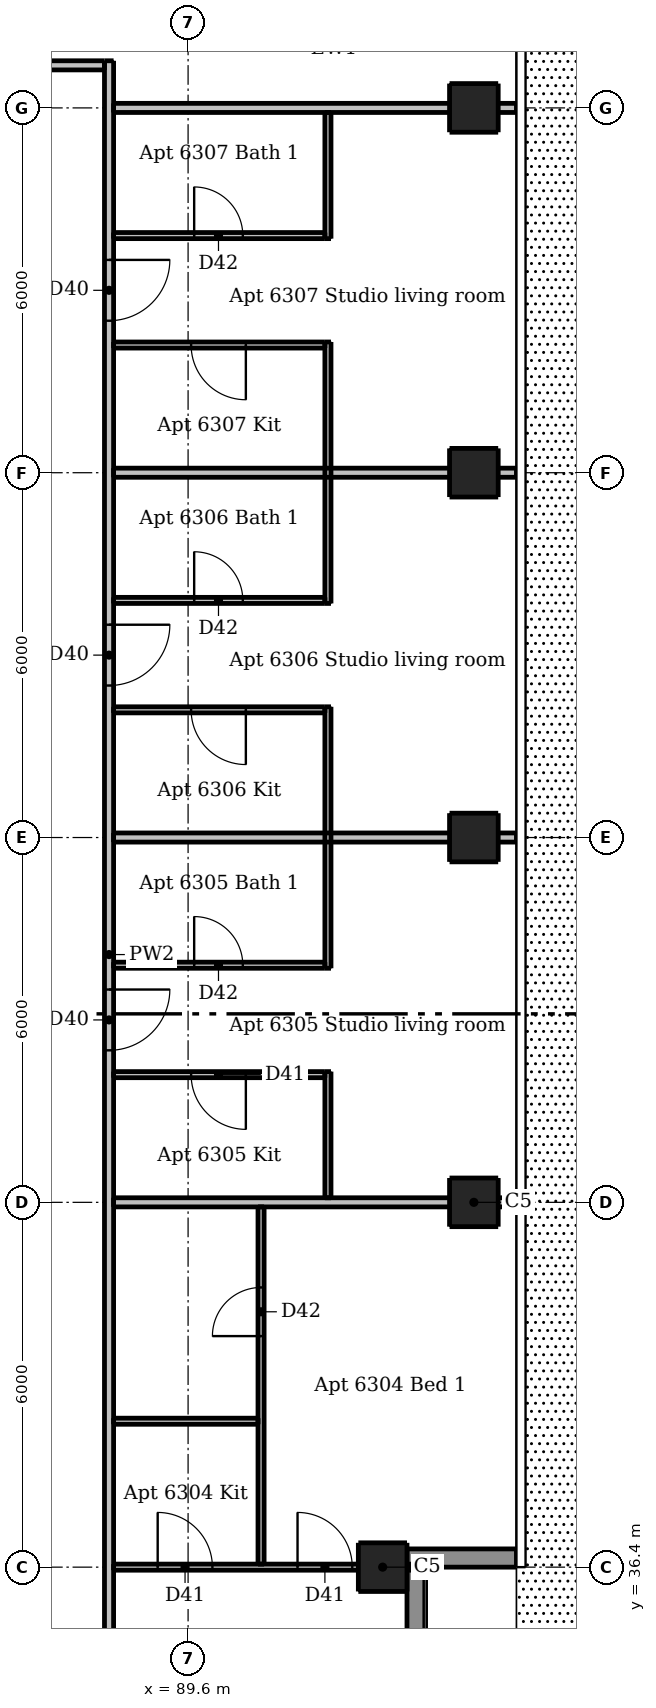
"""IFC4 building model, lengths in metres.
Left out: names, types, materials, properties, quantities, classifications, styles, units other than length and angle.
Written with IfcOpenShell. Run it as: python <this file> out.ifc"""

import sys

from ifc_helpers import new_model, si_unit, direction, frame, frame_2d, origin, origin_2d, place, context, subcontext, project, spatial, rectangle, extrude, element, fill, save


model = new_model("IFC4")
c1 = context("Model", 3, precision=1e-05, world=origin(), true_north=direction((0.0, 1.0)))
c2 = subcontext(c1, "Body", "Model", "MODEL_VIEW")
j1 = project(units=[si_unit("LENGTHUNIT", "METRE"), si_unit("PLANEANGLEUNIT", "RADIAN")], contexts=[c1])
p1 = place(None, origin())
s1 = spatial("IfcSite", under=j1, at=p1, CompositionType="ELEMENT")
p2 = place(p1, origin())
s2 = spatial("IfcBuilding", under=s1, at=p2, CompositionType="ELEMENT")
p3 = place(p2, frame((0.0, 0.0, 238.9)))
s3 = spatial("IfcBuildingStorey", under=s2, at=p3, CompositionType="ELEMENT", Elevation=238.9)
for number, where, z_axis, x_axis in (
    (1, (92.8, 36.4, 0.0), (0.0, 0.0, 1.0), (1.0, 0.0, 0.0)),
    (2, (94.3, 42.4, 0.0), (0.0, 0.0, 1.0), (1.0, 0.0, 0.0)),
    (3, (94.3, 48.4, 0.0), (0.0, 0.0, 1.0), (1.0, 0.0, 0.0)),
    (4, (94.3, 54.4, 0.0), (0.0, 0.0, 1.0), (1.0, 0.0, 0.0)),
    (5, (94.3, 60.4, 0.0), (0.0, 0.0, 1.0), (1.0, 0.0, 0.0)),
):
    element("IfcColumn", number, at=place(p3, frame(where, z_axis=z_axis, x_axis=x_axis)), inside=s3, PredefinedType="COLUMN", context=c2, shape_type="SweptSolid", body=[
        extrude(rectangle(XDim=0.8, YDim=0.8, at=origin_2d()), origin(), (0.0, 0.0, 1.0), 3.05),
    ])
p4 = place(p3, frame((93.2, 36.55, 0.0), z_axis=(0.0, 0.0, 1.0), x_axis=(1.0, 0.0, 0.0)))
e6 = element("IfcWall", 6, at=p4, inside=s3, PredefinedType="SOLIDWALL", context=c2, shape_type="SweptSolid", body=[
    extrude(rectangle(XDim=1.8, YDim=0.3, at=frame_2d((0.9, 0.0))), origin(), (0.0, 0.0, 1.0), 3.05),
])
p5 = place(p3, frame((93.35, 31.3, 0.0), z_axis=(0.0, 0.0, 1.0), x_axis=(0.0, 1.0, 0.0)))
e7 = element("IfcWall", 7, at=p5, inside=s3, PredefinedType="SOLIDWALL", context=c2, shape_type="SweptSolid", body=[
    extrude(rectangle(XDim=5.1, YDim=0.3, at=frame_2d((2.55, 0.0))), origin(), (0.0, 0.0, 1.0), 3.05),
])
p6 = place(p5, frame((1.2, 0.0, 0.15)))
e8 = element("IfcOpeningElement", 8, at=p6, cuts=e7, PredefinedType="OPENING", context=c2, shape_type="SweptSolid", body=[
    extrude(rectangle(XDim=2.7, YDim=2.1, at=frame_2d((1.35, 1.05))), frame((0.0, 0.16, 0.0), z_axis=(0.0, -1.0, 0.0), x_axis=(1.0, 0.0, 0.0)), (0.0, 0.0, 1.0), 0.32),
])
p7 = place(p3, frame((90.8, 36.45, 0.0), z_axis=(0.0, 0.0, 1.0), x_axis=(0.0, 1.0, 0.0)))
e9 = element("IfcWall", 9, at=p7, inside=s3, PredefinedType="PARTITIONING", context=c2, shape_type="SweptSolid", body=[
    extrude(rectangle(XDim=5.875, YDim=0.1, at=frame_2d((2.938, 0.0))), origin(), (0.0, 0.0, 1.0), 3.05),
])
p8 = place(p7, frame((3.75, 0.0, 0.0)))
e10 = element("IfcOpeningElement", 10, at=p8, cuts=e9, PredefinedType="OPENING", context=c2, shape_type="SweptSolid", body=[
    extrude(rectangle(XDim=0.8, YDim=2.1, at=frame_2d((0.4, 1.05))), frame((0.0, 0.06, 0.0), z_axis=(0.0, -1.0, 0.0), x_axis=(1.0, 0.0, 0.0)), (0.0, 0.0, 1.0), 0.12),
])
p9 = place(p3, frame((91.9, 42.475, 0.0), z_axis=(0.0, 0.0, 1.0), x_axis=(0.0, 1.0, 0.0)))
e11 = element("IfcWall", 11, at=p9, inside=s3, PredefinedType="PARTITIONING", context=c2, shape_type="SweptSolid", body=[
    extrude(rectangle(XDim=2.075, YDim=0.1, at=frame_2d((1.038, 0.0))), origin(), (0.0, 0.0, 1.0), 3.05),
])
for number, where, z_axis, x_axis in (
    (12, (91.9, 46.25, 0.0), (0.0, 0.0, 1.0), (0.0, 1.0, 0.0)),
    (13, (91.9, 52.25, 0.0), (0.0, 0.0, 1.0), (0.0, 1.0, 0.0)),
):
    element("IfcWall", number, at=place(p3, frame(where, z_axis=z_axis, x_axis=x_axis)), inside=s3, PredefinedType="PARTITIONING", context=c2, shape_type="SweptSolid", body=[
        extrude(rectangle(XDim=4.3, YDim=0.1, at=frame_2d((2.15, 0.0))), origin(), (0.0, 0.0, 1.0), 3.05),
    ])
p10 = place(p3, frame((91.9, 58.25, 0.0), z_axis=(0.0, 0.0, 1.0), x_axis=(0.0, 1.0, 0.0)))
e14 = element("IfcWall", 14, at=p10, inside=s3, PredefinedType="PARTITIONING", context=c2, shape_type="SweptSolid", body=[
    extrude(rectangle(XDim=2.075, YDim=0.1, at=frame_2d((1.038, 0.0))), origin(), (0.0, 0.0, 1.0), 3.05),
])
p11 = place(p3, frame((88.375, 58.3, 0.0), z_axis=(0.0, 0.0, 1.0), x_axis=(1.0, 0.0, 0.0)))
e15 = element("IfcWall", 15, at=p11, inside=s3, PredefinedType="PARTITIONING", context=c2, shape_type="SweptSolid", body=[
    extrude(rectangle(XDim=3.475, YDim=0.1, at=frame_2d((1.738, 0.0))), origin(), (0.0, 0.0, 1.0), 3.05),
])
p12 = place(p11, frame((1.325, 0.0, 0.0)))
e16 = element("IfcOpeningElement", 16, at=p12, cuts=e15, PredefinedType="OPENING", context=c2, shape_type="SweptSolid", body=[
    extrude(rectangle(XDim=0.8, YDim=2.1, at=frame_2d((0.4, 1.05))), frame((0.0, 0.06, 0.0), z_axis=(0.0, -1.0, 0.0), x_axis=(1.0, 0.0, 0.0)), (0.0, 0.0, 1.0), 0.12),
])
p13 = place(p3, frame((91.85, 56.5, 0.0), z_axis=(0.0, 0.0, 1.0), x_axis=(-1.0, 0.0, 0.0)))
e17 = element("IfcWall", 17, at=p13, inside=s3, PredefinedType="PARTITIONING", context=c2, shape_type="SweptSolid", body=[
    extrude(rectangle(XDim=3.475, YDim=0.1, at=frame_2d((1.738, 0.0))), origin(), (0.0, 0.0, 1.0), 3.05),
])
p14 = place(p13, frame((1.3, 0.0, 0.0)))
e18 = element("IfcOpeningElement", 18, at=p14, cuts=e17, PredefinedType="OPENING", context=c2, shape_type="SweptSolid", body=[
    extrude(rectangle(XDim=0.9, YDim=2.1, at=frame_2d((0.45, 1.05))), frame((0.0, 0.06, 0.0), z_axis=(0.0, -1.0, 0.0), x_axis=(1.0, 0.0, 0.0)), (0.0, 0.0, 1.0), 0.12),
])
p15 = place(p3, frame((88.375, 52.3, 0.0), z_axis=(0.0, 0.0, 1.0), x_axis=(1.0, 0.0, 0.0)))
e19 = element("IfcWall", 19, at=p15, inside=s3, PredefinedType="PARTITIONING", context=c2, shape_type="SweptSolid", body=[
    extrude(rectangle(XDim=3.475, YDim=0.1, at=frame_2d((1.738, 0.0))), origin(), (0.0, 0.0, 1.0), 3.05),
])
p16 = place(p15, frame((1.325, 0.0, 0.0)))
e20 = element("IfcOpeningElement", 20, at=p16, cuts=e19, PredefinedType="OPENING", context=c2, shape_type="SweptSolid", body=[
    extrude(rectangle(XDim=0.8, YDim=2.1, at=frame_2d((0.4, 1.05))), frame((0.0, 0.06, 0.0), z_axis=(0.0, -1.0, 0.0), x_axis=(1.0, 0.0, 0.0)), (0.0, 0.0, 1.0), 0.12),
])
p17 = place(p3, frame((91.85, 50.5, 0.0), z_axis=(0.0, 0.0, 1.0), x_axis=(-1.0, 0.0, 0.0)))
e21 = element("IfcWall", 21, at=p17, inside=s3, PredefinedType="PARTITIONING", context=c2, shape_type="SweptSolid", body=[
    extrude(rectangle(XDim=3.475, YDim=0.1, at=frame_2d((1.738, 0.0))), origin(), (0.0, 0.0, 1.0), 3.05),
])
p18 = place(p17, frame((1.3, 0.0, 0.0)))
e22 = element("IfcOpeningElement", 22, at=p18, cuts=e21, PredefinedType="OPENING", context=c2, shape_type="SweptSolid", body=[
    extrude(rectangle(XDim=0.9, YDim=2.1, at=frame_2d((0.45, 1.05))), frame((0.0, 0.06, 0.0), z_axis=(0.0, -1.0, 0.0), x_axis=(1.0, 0.0, 0.0)), (0.0, 0.0, 1.0), 0.12),
])
p19 = place(p3, frame((88.375, 46.3, 0.0), z_axis=(0.0, 0.0, 1.0), x_axis=(1.0, 0.0, 0.0)))
e23 = element("IfcWall", 23, at=p19, inside=s3, PredefinedType="PARTITIONING", context=c2, shape_type="SweptSolid", body=[
    extrude(rectangle(XDim=3.475, YDim=0.1, at=frame_2d((1.738, 0.0))), origin(), (0.0, 0.0, 1.0), 3.05),
])
p20 = place(p19, frame((1.325, 0.0, 0.0)))
e24 = element("IfcOpeningElement", 24, at=p20, cuts=e23, PredefinedType="OPENING", context=c2, shape_type="SweptSolid", body=[
    extrude(rectangle(XDim=0.8, YDim=2.1, at=frame_2d((0.4, 1.05))), frame((0.0, 0.06, 0.0), z_axis=(0.0, -1.0, 0.0), x_axis=(1.0, 0.0, 0.0)), (0.0, 0.0, 1.0), 0.12),
])
p21 = place(p3, frame((91.85, 44.5, 0.0), z_axis=(0.0, 0.0, 1.0), x_axis=(-1.0, 0.0, 0.0)))
e25 = element("IfcWall", 25, at=p21, inside=s3, PredefinedType="PARTITIONING", context=c2, shape_type="SweptSolid", body=[
    extrude(rectangle(XDim=3.475, YDim=0.1, at=frame_2d((1.738, 0.0))), origin(), (0.0, 0.0, 1.0), 3.05),
])
p22 = place(p21, frame((1.3, 0.0, 0.0)))
e26 = element("IfcOpeningElement", 26, at=p22, cuts=e25, PredefinedType="OPENING", context=c2, shape_type="SweptSolid", body=[
    extrude(rectangle(XDim=0.9, YDim=2.1, at=frame_2d((0.45, 1.05))), frame((0.0, 0.06, 0.0), z_axis=(0.0, -1.0, 0.0), x_axis=(1.0, 0.0, 0.0)), (0.0, 0.0, 1.0), 0.12),
])
p23 = place(p3, frame((88.375, 38.8, 0.0), z_axis=(0.0, 0.0, 1.0), x_axis=(1.0, 0.0, 0.0)))
e27 = element("IfcWall", 27, at=p23, inside=s3, PredefinedType="PARTITIONING", context=c2, shape_type="SweptSolid", body=[
    extrude(rectangle(XDim=2.375, YDim=0.1, at=frame_2d((1.188, 0.0))), origin(), (0.0, 0.0, 1.0), 3.05),
])
p24 = place(p3, frame((88.375, 36.4, 0.0), z_axis=(0.0, 0.0, 1.0), x_axis=(1.0, 0.0, 0.0)))
e28 = element("IfcWall", 28, at=p24, inside=s3, PredefinedType="PARTITIONING", context=c2, shape_type="SweptSolid", body=[
    extrude(rectangle(XDim=5.125, YDim=0.1, at=frame_2d((2.562, 0.0))), origin(), (0.0, 0.0, 1.0), 2.647),
])
p25 = place(p24, frame((0.725, 0.0, 0.0)))
e29 = element("IfcOpeningElement", 29, at=p25, cuts=e28, PredefinedType="OPENING", context=c2, shape_type="SweptSolid", body=[
    extrude(rectangle(XDim=0.9, YDim=2.1, at=frame_2d((0.45, 1.05))), frame((0.0, 0.06, 0.0), z_axis=(0.0, -1.0, 0.0), x_axis=(1.0, 0.0, 0.0)), (0.0, 0.0, 1.0), 0.12),
])
p26 = place(p24, frame((3.025, 0.0, 0.0)))
e30 = element("IfcOpeningElement", 30, at=p26, cuts=e28, PredefinedType="OPENING", context=c2, shape_type="SweptSolid", body=[
    extrude(rectangle(XDim=0.9, YDim=2.1, at=frame_2d((0.45, 1.05))), frame((0.0, 0.06, 0.0), z_axis=(0.0, -1.0, 0.0), x_axis=(1.0, 0.0, 0.0)), (0.0, 0.0, 1.0), 0.12),
])
p27 = place(p3, frame((88.3, 61.175, 0.0), z_axis=(0.0, 0.0, 1.0), x_axis=(0.0, -1.0, 0.0)))
e31 = element("IfcWall", 31, at=p27, inside=s3, PredefinedType="PARTITIONING", context=c2, shape_type="SweptSolid", body=[
    extrude(rectangle(XDim=29.4, YDim=0.15, at=frame_2d((14.7, 0.0))), origin(), (0.0, 0.0, 1.0), 3.05),
])
p28 = place(p27, frame((26.625, 0.0, 0.0)))
e32 = element("IfcOpeningElement", 32, at=p28, cuts=e31, PredefinedType="OPENING", context=c2, shape_type="SweptSolid", body=[
    extrude(rectangle(XDim=1.0, YDim=2.1, at=frame_2d((0.5, 1.05))), frame((0.0, 0.085, 0.0), z_axis=(0.0, -1.0, 0.0), x_axis=(1.0, 0.0, 0.0)), (0.0, 0.0, 1.0), 0.17),
])
p29 = place(p27, frame((15.275, 0.0, 0.0)))
e33 = element("IfcOpeningElement", 33, at=p29, cuts=e31, PredefinedType="OPENING", context=c2, shape_type="SweptSolid", body=[
    extrude(rectangle(XDim=1.0, YDim=2.1, at=frame_2d((0.5, 1.05))), frame((0.0, 0.085, 0.0), z_axis=(0.0, -1.0, 0.0), x_axis=(1.0, 0.0, 0.0)), (0.0, 0.0, 1.0), 0.17),
])
p30 = place(p27, frame((9.275, 0.0, 0.0)))
e34 = element("IfcOpeningElement", 34, at=p30, cuts=e31, PredefinedType="OPENING", context=c2, shape_type="SweptSolid", body=[
    extrude(rectangle(XDim=1.0, YDim=2.1, at=frame_2d((0.5, 1.05))), frame((0.0, 0.085, 0.0), z_axis=(0.0, -1.0, 0.0), x_axis=(1.0, 0.0, 0.0)), (0.0, 0.0, 1.0), 0.17),
])
p31 = place(p27, frame((3.275, 0.0, 0.0)))
e35 = element("IfcOpeningElement", 35, at=p31, cuts=e31, PredefinedType="OPENING", context=c2, shape_type="SweptSolid", body=[
    extrude(rectangle(XDim=1.0, YDim=2.1, at=frame_2d((0.5, 1.05))), frame((0.0, 0.085, 0.0), z_axis=(0.0, -1.0, 0.0), x_axis=(1.0, 0.0, 0.0)), (0.0, 0.0, 1.0), 0.17),
])
p32 = place(p3, frame((58.975, 61.1, 0.0), z_axis=(0.0, 0.0, 1.0), x_axis=(1.0, 0.0, 0.0)))
e36 = element("IfcWall", 36, at=p32, inside=s3, PredefinedType="PARTITIONING", context=c2, shape_type="SweptSolid", body=[
    extrude(rectangle(XDim=29.25, YDim=0.15, at=frame_2d((14.625, 0.0))), origin(), (0.0, 0.0, 1.0), 3.05),
])
p33 = place(p32, frame((3.125, 0.0, 0.0)))
e37 = element("IfcOpeningElement", 37, at=p33, cuts=e36, PredefinedType="OPENING", context=c2, shape_type="SweptSolid", body=[
    extrude(rectangle(XDim=1.0, YDim=2.1, at=frame_2d((0.5, 1.05))), frame((0.0, 0.085, 0.0), z_axis=(0.0, -1.0, 0.0), x_axis=(1.0, 0.0, 0.0)), (0.0, 0.0, 1.0), 0.17),
])
p34 = place(p32, frame((13.925, 0.0, 0.0)))
e38 = element("IfcOpeningElement", 38, at=p34, cuts=e36, PredefinedType="OPENING", context=c2, shape_type="SweptSolid", body=[
    extrude(rectangle(XDim=1.0, YDim=2.1, at=frame_2d((0.5, 1.05))), frame((0.0, 0.085, 0.0), z_axis=(0.0, -1.0, 0.0), x_axis=(1.0, 0.0, 0.0)), (0.0, 0.0, 1.0), 0.17),
])
p35 = place(p32, frame((26.475, 0.0, 0.0)))
e39 = element("IfcOpeningElement", 39, at=p35, cuts=e36, PredefinedType="OPENING", context=c2, shape_type="SweptSolid", body=[
    extrude(rectangle(XDim=1.0, YDim=2.1, at=frame_2d((0.5, 1.05))), frame((0.0, 0.085, 0.0), z_axis=(0.0, -1.0, 0.0), x_axis=(1.0, 0.0, 0.0)), (0.0, 0.0, 1.0), 0.17),
])
p36 = place(p3, frame((88.375, 60.4, 0.0), z_axis=(0.0, 0.0, 1.0), x_axis=(1.0, 0.0, 0.0)))
e40 = element("IfcWall", 40, at=p36, inside=s3, PredefinedType="PARTITIONING", context=c2, shape_type="SweptSolid", body=[
    extrude(rectangle(XDim=6.625, YDim=0.15, at=frame_2d((3.312, 0.0))), origin(), (0.0, 0.0, 1.0), 2.647),
])
for number, where, z_axis, x_axis in (
    (41, (88.375, 54.4, 0.0), (0.0, 0.0, 1.0), (1.0, 0.0, 0.0)),
    (42, (88.375, 48.4, 0.0), (0.0, 0.0, 1.0), (1.0, 0.0, 0.0)),
    (43, (88.375, 42.4, 0.0), (0.0, 0.0, 1.0), (1.0, 0.0, 0.0)),
):
    element("IfcWall", number, at=place(p3, frame(where, z_axis=z_axis, x_axis=x_axis)), inside=s3, PredefinedType="PARTITIONING", context=c2, shape_type="SweptSolid", body=[
        extrude(rectangle(XDim=6.625, YDim=0.15, at=frame_2d((3.312, 0.0))), origin(), (0.0, 0.0, 1.0), 2.59),
    ])
p37 = place(p25, origin())
e44 = element("IfcDoor", 44, at=p37, inside=s3, OperationType="SINGLE_SWING_LEFT", PredefinedType="DOOR", context=c2, shape_type="SweptSolid", body=[
    extrude(rectangle(XDim=0.9, YDim=2.1, at=frame_2d((0.45, 1.05))), frame((0.0, 0.025, 0.0), z_axis=(0.0, -1.0, 0.0), x_axis=(1.0, 0.0, 0.0)), (0.0, 0.0, 1.0), 0.05),
])
fill(e29, e44)
p38 = place(p26, origin())
e45 = element("IfcDoor", 45, at=p38, inside=s3, OperationType="SINGLE_SWING_LEFT", PredefinedType="DOOR", context=c2, shape_type="SweptSolid", body=[
    extrude(rectangle(XDim=0.9, YDim=2.1, at=frame_2d((0.45, 1.05))), frame((0.0, 0.025, 0.0), z_axis=(0.0, -1.0, 0.0), x_axis=(1.0, 0.0, 0.0)), (0.0, 0.0, 1.0), 0.05),
])
fill(e30, e45)
p39 = place(p8, origin())
e46 = element("IfcDoor", 46, at=p39, inside=s3, OperationType="SINGLE_SWING_LEFT", PredefinedType="DOOR", context=c2, shape_type="SweptSolid", body=[
    extrude(rectangle(XDim=0.8, YDim=2.1, at=frame_2d((0.4, 1.05))), frame((0.0, 0.025, 0.0), z_axis=(0.0, -1.0, 0.0), x_axis=(1.0, 0.0, 0.0)), (0.0, 0.0, 1.0), 0.05),
])
fill(e10, e46)
p40 = place(p29, origin())
e47 = element("IfcDoor", 47, at=p40, inside=s3, OperationType="SINGLE_SWING_LEFT", PredefinedType="DOOR", context=c2, shape_type="SweptSolid", body=[
    extrude(rectangle(XDim=1.0, YDim=2.1, at=frame_2d((0.5, 1.05))), frame((0.0, 0.025, 0.0), z_axis=(0.0, -1.0, 0.0), x_axis=(1.0, 0.0, 0.0)), (0.0, 0.0, 1.0), 0.05),
])
fill(e33, e47)
p41 = place(p22, origin())
e48 = element("IfcDoor", 48, at=p41, inside=s3, OperationType="SINGLE_SWING_LEFT", PredefinedType="DOOR", context=c2, shape_type="SweptSolid", body=[
    extrude(rectangle(XDim=0.9, YDim=2.1, at=frame_2d((0.45, 1.05))), frame((0.0, 0.025, 0.0), z_axis=(0.0, -1.0, 0.0), x_axis=(1.0, 0.0, 0.0)), (0.0, 0.0, 1.0), 0.05),
])
fill(e26, e48)
p42 = place(p20, origin())
e49 = element("IfcDoor", 49, at=p42, inside=s3, OperationType="SINGLE_SWING_LEFT", PredefinedType="DOOR", context=c2, shape_type="SweptSolid", body=[
    extrude(rectangle(XDim=0.8, YDim=2.1, at=frame_2d((0.4, 1.05))), frame((0.0, 0.025, 0.0), z_axis=(0.0, -1.0, 0.0), x_axis=(1.0, 0.0, 0.0)), (0.0, 0.0, 1.0), 0.05),
])
fill(e24, e49)
p43 = place(p30, origin())
e50 = element("IfcDoor", 50, at=p43, inside=s3, OperationType="SINGLE_SWING_LEFT", PredefinedType="DOOR", context=c2, shape_type="SweptSolid", body=[
    extrude(rectangle(XDim=1.0, YDim=2.1, at=frame_2d((0.5, 1.05))), frame((0.0, 0.025, 0.0), z_axis=(0.0, -1.0, 0.0), x_axis=(1.0, 0.0, 0.0)), (0.0, 0.0, 1.0), 0.05),
])
fill(e34, e50)
p44 = place(p18, origin())
e51 = element("IfcDoor", 51, at=p44, inside=s3, OperationType="SINGLE_SWING_LEFT", PredefinedType="DOOR", context=c2, shape_type="SweptSolid", body=[
    extrude(rectangle(XDim=0.9, YDim=2.1, at=frame_2d((0.45, 1.05))), frame((0.0, 0.025, 0.0), z_axis=(0.0, -1.0, 0.0), x_axis=(1.0, 0.0, 0.0)), (0.0, 0.0, 1.0), 0.05),
])
fill(e22, e51)
p45 = place(p16, origin())
e52 = element("IfcDoor", 52, at=p45, inside=s3, OperationType="SINGLE_SWING_LEFT", PredefinedType="DOOR", context=c2, shape_type="SweptSolid", body=[
    extrude(rectangle(XDim=0.8, YDim=2.1, at=frame_2d((0.4, 1.05))), frame((0.0, 0.025, 0.0), z_axis=(0.0, -1.0, 0.0), x_axis=(1.0, 0.0, 0.0)), (0.0, 0.0, 1.0), 0.05),
])
fill(e20, e52)
p46 = place(p31, origin())
e53 = element("IfcDoor", 53, at=p46, inside=s3, OperationType="SINGLE_SWING_LEFT", PredefinedType="DOOR", context=c2, shape_type="SweptSolid", body=[
    extrude(rectangle(XDim=1.0, YDim=2.1, at=frame_2d((0.5, 1.05))), frame((0.0, 0.025, 0.0), z_axis=(0.0, -1.0, 0.0), x_axis=(1.0, 0.0, 0.0)), (0.0, 0.0, 1.0), 0.05),
])
fill(e35, e53)
p47 = place(p14, origin())
e54 = element("IfcDoor", 54, at=p47, inside=s3, OperationType="SINGLE_SWING_LEFT", PredefinedType="DOOR", context=c2, shape_type="SweptSolid", body=[
    extrude(rectangle(XDim=0.9, YDim=2.1, at=frame_2d((0.45, 1.05))), frame((0.0, 0.025, 0.0), z_axis=(0.0, -1.0, 0.0), x_axis=(1.0, 0.0, 0.0)), (0.0, 0.0, 1.0), 0.05),
])
fill(e18, e54)
p48 = place(p12, origin())
e55 = element("IfcDoor", 55, at=p48, inside=s3, OperationType="SINGLE_SWING_LEFT", PredefinedType="DOOR", context=c2, shape_type="SweptSolid", body=[
    extrude(rectangle(XDim=0.8, YDim=2.1, at=frame_2d((0.4, 1.05))), frame((0.0, 0.025, 0.0), z_axis=(0.0, -1.0, 0.0), x_axis=(1.0, 0.0, 0.0)), (0.0, 0.0, 1.0), 0.05),
])
fill(e16, e55)
save(model, sys.argv[1])
